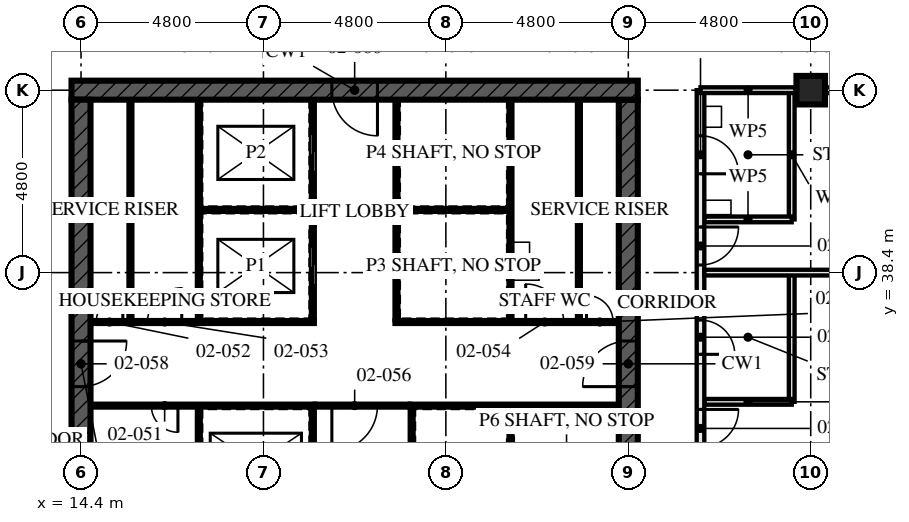
"""IFC4 building model, lengths in metres.
Left out: names, types, materials, properties, quantities, classifications, styles, units other than length and angle.
Written with IfcOpenShell. Run it as: python <this file> out.ifc"""

import sys

from ifc_helpers import new_model, si_unit, direction, frame, frame_2d, origin, origin_2d, place, context, subcontext, project, spatial, rectangle, hollow_rectangle, extrude, element, fill, save


model = new_model("IFC4")
c1 = context("Model", 3, precision=1e-05, world=origin(), true_north=direction((0.0, 1.0)))
c2 = subcontext(c1, "Body", "Model", "MODEL_VIEW")
j1 = project(units=[si_unit("LENGTHUNIT", "METRE"), si_unit("PLANEANGLEUNIT", "RADIAN")], contexts=[c1])
p1 = place(None, origin())
s1 = spatial("IfcSite", under=j1, at=p1, CompositionType="ELEMENT")
p2 = place(p1, origin())
s2 = spatial("IfcBuilding", under=s1, at=p2, CompositionType="ELEMENT")
p3 = place(p2, frame((0.0, 0.0, 9.0)))
s3 = spatial("IfcBuildingStorey", under=s2, at=p3, CompositionType="ELEMENT", Elevation=9.0)
p4 = place(p3, frame((33.6, 43.2, 0.0), z_axis=(0.0, 0.0, 1.0), x_axis=(0.0, 1.0, 0.0)))
e1 = element("IfcColumn", 1, at=p4, inside=s3, PredefinedType="COLUMN", context=c2, shape_type="SweptSolid", body=[
    extrude(hollow_rectangle(XDim=0.75, YDim=0.75, WallThickness=0.08, at=origin_2d()), origin(), (0.0, 0.0, 1.0), 4.5),
])
p5 = place(p3, frame((29.05, 43.2, -0.17), z_axis=(0.0, 0.0, 1.0), x_axis=(-1.0, 0.0, 0.0)))
e2 = element("IfcWall", 2, at=p5, inside=s3, PredefinedType="SHEAR", context=c2, shape_type="SweptSolid", body=[
    extrude(rectangle(XDim=14.9, YDim=0.5, at=frame_2d((7.45, 0.0))), origin(), (0.0, 0.0, 1.0), 4.5),
])
p6 = place(p5, frame((6.85, 0.0, 0.17)))
e3 = element("IfcOpeningElement", 3, at=p6, cuts=e2, PredefinedType="OPENING", context=c2, shape_type="SweptSolid", body=[
    extrude(rectangle(XDim=1.2, YDim=2.1, at=frame_2d((0.6, 1.05))), frame((0.0, 0.26, 0.0), z_axis=(0.0, -1.0, 0.0), x_axis=(1.0, 0.0, 0.0)), (0.0, 0.0, 1.0), 0.521),
])
p7 = place(p3, frame((14.4, 42.95, -0.17), z_axis=(0.0, 0.0, 1.0), x_axis=(0.0, -1.0, 0.0)))
e4 = element("IfcWall", 4, at=p7, inside=s3, PredefinedType="SHEAR", context=c2, shape_type="SweptSolid", body=[
    extrude(rectangle(XDim=13.9, YDim=0.5, at=frame_2d((6.95, 0.0))), origin(), (0.0, 0.0, 1.0), 4.5),
])
p8 = place(p7, frame((6.35, 0.0, 0.17)))
e5 = element("IfcOpeningElement", 5, at=p8, cuts=e4, PredefinedType="OPENING", context=c2, shape_type="SweptSolid", body=[
    extrude(rectangle(XDim=1.2, YDim=2.1, at=frame_2d((0.6, 1.05))), frame((0.0, 0.26, 0.0), z_axis=(0.0, -1.0, 0.0), x_axis=(1.0, 0.0, 0.0)), (0.0, 0.0, 1.0), 0.521),
])
p9 = place(p3, frame((28.8, 29.05, -0.17), z_axis=(0.0, 0.0, 1.0), x_axis=(0.0, 1.0, 0.0)))
e6 = element("IfcWall", 6, at=p9, inside=s3, PredefinedType="SHEAR", context=c2, shape_type="SweptSolid", body=[
    extrude(rectangle(XDim=13.9, YDim=0.5, at=frame_2d((6.95, 0.0))), origin(), (0.0, 0.0, 1.0), 4.5),
])
p10 = place(p9, frame((6.35, 0.0, 0.17)))
e7 = element("IfcOpeningElement", 7, at=p10, cuts=e6, PredefinedType="OPENING", context=c2, shape_type="SweptSolid", body=[
    extrude(rectangle(XDim=1.2, YDim=2.1, at=frame_2d((0.6, 1.05))), frame((0.0, 0.26, 0.0), z_axis=(0.0, -1.0, 0.0), x_axis=(1.0, 0.0, 0.0)), (0.0, 0.0, 1.0), 0.521),
])
p11 = place(p3, frame((33.1, 35.0, 0.0), z_axis=(0.0, 0.0, 1.0), x_axis=(-1.0, 0.0, 0.0)))
e8 = element("IfcWall", 8, at=p11, inside=s3, PredefinedType="PARTITIONING", context=c2, shape_type="SweptSolid", body=[
    extrude(rectangle(XDim=2.3, YDim=0.15, at=frame_2d((1.15, 0.0))), origin(), (0.0, 0.0, 1.0), 4.33),
])
p12 = place(p3, frame((33.1, 35.0, 0.0), z_axis=(0.0, 0.0, 1.0), x_axis=(0.0, 1.0, 0.0)))
e9 = element("IfcWall", 9, at=p12, inside=s3, PredefinedType="PARTITIONING", context=c2, shape_type="SweptSolid", body=[
    extrude(rectangle(XDim=3.4, YDim=0.15, at=frame_2d((1.7, 0.0))), origin(), (0.0, 0.0, 1.0), 4.33),
])
p13 = place(p3, frame((33.1, 39.8, 0.0), z_axis=(0.0, 0.0, 1.0), x_axis=(-1.0, 0.0, 0.0)))
e10 = element("IfcWall", 10, at=p13, inside=s3, PredefinedType="PARTITIONING", context=c2, shape_type="SweptSolid", body=[
    extrude(rectangle(XDim=2.3, YDim=0.15, at=frame_2d((1.15, 0.0))), origin(), (0.0, 0.0, 1.0), 4.33),
])
p14 = place(p3, frame((33.1, 39.8, 0.0), z_axis=(0.0, 0.0, 1.0), x_axis=(0.0, 1.0, 0.0)))
e11 = element("IfcWall", 11, at=p14, inside=s3, PredefinedType="PARTITIONING", context=c2, shape_type="SweptSolid", body=[
    extrude(rectangle(XDim=3.4, YDim=0.15, at=frame_2d((1.7, 0.0))), origin(), (0.0, 0.0, 1.0), 4.33),
])
p15 = place(p3, frame((42.805, 38.4, 0.0), z_axis=(0.0, 0.0, 1.0), x_axis=(-1.0, 0.0, 0.0)))
e12 = element("IfcWall", 12, at=p15, inside=s3, PredefinedType="PARTITIONING", context=c2, shape_type="SweptSolid", body=[
    extrude(rectangle(XDim=12.005, YDim=0.15, at=frame_2d((6.002, 0.0))), origin(), (0.0, 0.0, 1.0), 3.55),
])
p16 = place(p3, frame((30.7, 28.8, 0.0), z_axis=(0.0, 0.0, 1.0), x_axis=(0.0, 1.0, 0.0)))
e13 = element("IfcWall", 13, at=p16, inside=s3, PredefinedType="PARTITIONING", context=c2, shape_type="SweptSolid", body=[
    extrude(rectangle(XDim=14.4, YDim=0.2, at=frame_2d((7.2, 0.0))), origin(), (0.0, 0.0, 1.0), 3.55),
])
p17 = place(p16, frame((1.4, 0.0, 0.0)))
e14 = element("IfcOpeningElement", 14, at=p17, cuts=e13, PredefinedType="OPENING", context=c2, shape_type="SweptSolid", body=[
    extrude(rectangle(XDim=1.0, YDim=2.1, at=frame_2d((0.5, 1.05))), frame((0.0, 0.111, 0.0), z_axis=(0.0, -1.0, 0.0), x_axis=(1.0, 0.0, 0.0)), (0.0, 0.0, 1.0), 0.221),
])
p18 = place(p16, frame((3.6, 0.0, 0.0)))
e15 = element("IfcOpeningElement", 15, at=p18, cuts=e13, PredefinedType="OPENING", context=c2, shape_type="SweptSolid", body=[
    extrude(rectangle(XDim=1.0, YDim=2.4, at=frame_2d((0.5, 1.2))), frame((0.0, 0.111, 0.0), z_axis=(0.0, -1.0, 0.0), x_axis=(1.0, 0.0, 0.0)), (0.0, 0.0, 1.0), 0.221),
])
p19 = place(p16, frame((5.0, 0.0, 0.0)))
e16 = element("IfcOpeningElement", 16, at=p19, cuts=e13, PredefinedType="OPENING", context=c2, shape_type="SweptSolid", body=[
    extrude(rectangle(XDim=1.0, YDim=2.4, at=frame_2d((0.5, 1.2))), frame((0.0, 0.111, 0.0), z_axis=(0.0, -1.0, 0.0), x_axis=(1.0, 0.0, 0.0)), (0.0, 0.0, 1.0), 0.221),
])
p20 = place(p16, frame((9.8, 0.0, 0.0)))
e17 = element("IfcOpeningElement", 17, at=p20, cuts=e13, PredefinedType="OPENING", context=c2, shape_type="SweptSolid", body=[
    extrude(rectangle(XDim=1.0, YDim=2.4, at=frame_2d((0.5, 1.2))), frame((0.0, 0.111, 0.0), z_axis=(0.0, -1.0, 0.0), x_axis=(1.0, 0.0, 0.0)), (0.0, 0.0, 1.0), 0.221),
])
p21 = place(p16, frame((7.45, 0.0, 0.0)))
e18 = element("IfcOpeningElement", 18, at=p21, cuts=e13, PredefinedType="OPENING", context=c2, shape_type="SweptSolid", body=[
    extrude(rectangle(XDim=0.9, YDim=2.1, at=frame_2d((0.45, 1.05))), frame((0.0, 0.111, 0.0), z_axis=(0.0, -1.0, 0.0), x_axis=(1.0, 0.0, 0.0)), (0.0, 0.0, 1.0), 0.221),
])
p22 = place(p16, frame((12.2, 0.0, 0.0)))
e19 = element("IfcOpeningElement", 19, at=p22, cuts=e13, PredefinedType="OPENING", context=c2, shape_type="SweptSolid", body=[
    extrude(rectangle(XDim=1.0, YDim=2.1, at=frame_2d((0.5, 1.05))), frame((0.0, 0.111, 0.0), z_axis=(0.0, -1.0, 0.0), x_axis=(1.0, 0.0, 0.0)), (0.0, 0.0, 1.0), 0.221),
])
for number, where, z_axis, x_axis in (
    (20, (15.7, 37.15, 0.0), (0.0, 0.0, 1.0), (0.0, 1.0, 0.0)),
    (21, (27.5, 37.15, 0.0), (0.0, 0.0, 1.0), (0.0, 1.0, 0.0)),
):
    element("IfcWall", number, at=place(p3, frame(where, z_axis=z_axis, x_axis=x_axis)), inside=s3, PredefinedType="SOLIDWALL", context=c2, shape_type="SweptSolid", body=[
        extrude(rectangle(XDim=5.8, YDim=0.1, at=frame_2d((2.9, 0.0))), origin(), (0.0, 0.0, 1.0), 4.33),
    ])
p23 = place(p3, frame((20.5, 29.05, 0.0), z_axis=(0.0, 0.0, 1.0), x_axis=(0.0, 1.0, 0.0)))
e22 = element("IfcWall", 22, at=p23, inside=s3, PredefinedType="SOLIDWALL", context=c2, shape_type="SweptSolid", body=[
    extrude(rectangle(XDim=5.8, YDim=0.1, at=frame_2d((2.9, 0.0))), origin(), (0.0, 0.0, 1.0), 4.33),
])
p24 = place(p23, frame((0.8, 0.0, 0.0)))
e23 = element("IfcOpeningElement", 23, at=p24, cuts=e22, PredefinedType="OPENING", context=c2, shape_type="SweptSolid", body=[
    extrude(rectangle(XDim=1.1, YDim=2.3, at=frame_2d((0.55, 1.15))), frame((0.0, 0.061, 0.0), z_axis=(0.0, -1.0, 0.0), x_axis=(1.0, 0.0, 0.0)), (0.0, 0.0, 1.0), 0.121),
])
p25 = place(p23, frame((3.775, 0.0, 0.0)))
e24 = element("IfcOpeningElement", 24, at=p25, cuts=e22, PredefinedType="OPENING", context=c2, shape_type="SweptSolid", body=[
    extrude(rectangle(XDim=1.1, YDim=2.3, at=frame_2d((0.55, 1.15))), frame((0.0, 0.061, 0.0), z_axis=(0.0, -1.0, 0.0), x_axis=(1.0, 0.0, 0.0)), (0.0, 0.0, 1.0), 0.121),
])
p26 = place(p3, frame((20.5, 37.15, 0.0), z_axis=(0.0, 0.0, 1.0), x_axis=(0.0, 1.0, 0.0)))
e25 = element("IfcWall", 25, at=p26, inside=s3, PredefinedType="SOLIDWALL", context=c2, shape_type="SweptSolid", body=[
    extrude(rectangle(XDim=5.8, YDim=0.1, at=frame_2d((2.9, 0.0))), origin(), (0.0, 0.0, 1.0), 4.33),
])
p27 = place(p26, frame((0.925, 0.0, 0.0)))
e26 = element("IfcOpeningElement", 26, at=p27, cuts=e25, PredefinedType="OPENING", context=c2, shape_type="SweptSolid", body=[
    extrude(rectangle(XDim=1.0, YDim=2.1, at=frame_2d((0.5, 1.05))), frame((0.0, 0.061, 0.0), z_axis=(0.0, -1.0, 0.0), x_axis=(1.0, 0.0, 0.0)), (0.0, 0.0, 1.0), 0.121),
])
p28 = place(p26, frame((3.9, 0.0, 0.0)))
e27 = element("IfcOpeningElement", 27, at=p28, cuts=e25, PredefinedType="OPENING", context=c2, shape_type="SweptSolid", body=[
    extrude(rectangle(XDim=1.0, YDim=2.1, at=frame_2d((0.5, 1.05))), frame((0.0, 0.061, 0.0), z_axis=(0.0, -1.0, 0.0), x_axis=(1.0, 0.0, 0.0)), (0.0, 0.0, 1.0), 0.121),
])
p29 = place(p3, frame((22.7, 37.15, 0.0), z_axis=(0.0, 0.0, 1.0), x_axis=(0.0, 1.0, 0.0)))
e28 = element("IfcWall", 28, at=p29, inside=s3, PredefinedType="SOLIDWALL", context=c2, shape_type="SweptSolid", body=[
    extrude(rectangle(XDim=5.8, YDim=0.1, at=frame_2d((2.9, 0.0))), origin(), (0.0, 0.0, 1.0), 4.33),
])
p30 = place(p3, frame((23.1, 29.05, 0.0), z_axis=(0.0, 0.0, 1.0), x_axis=(0.0, 1.0, 0.0)))
e29 = element("IfcWall", 29, at=p30, inside=s3, PredefinedType="SOLIDWALL", context=c2, shape_type="SweptSolid", body=[
    extrude(rectangle(XDim=5.8, YDim=0.1, at=frame_2d((2.9, 0.0))), origin(), (0.0, 0.0, 1.0), 4.33),
])
p31 = place(p30, frame((1.0, 0.0, 0.0)))
e30 = element("IfcOpeningElement", 30, at=p31, cuts=e29, PredefinedType="OPENING", context=c2, shape_type="SweptSolid", body=[
    extrude(rectangle(XDim=0.7, YDim=2.1, at=frame_2d((0.35, 1.05))), frame((0.0, 0.061, 0.0), z_axis=(0.0, -1.0, 0.0), x_axis=(1.0, 0.0, 0.0)), (0.0, 0.0, 1.0), 0.121),
])
p32 = place(p3, frame((14.65, 34.9, 0.0), z_axis=(0.0, 0.0, 1.0), x_axis=(1.0, 0.0, 0.0)))
e31 = element("IfcWall", 31, at=p32, inside=s3, PredefinedType="SOLIDWALL", context=c2, shape_type="SweptSolid", body=[
    extrude(rectangle(XDim=5.9, YDim=0.1, at=frame_2d((2.95, 0.0))), origin(), (0.0, 0.0, 1.0), 4.33),
])
p33 = place(p32, frame((1.6, 0.0, 0.0)))
e32 = element("IfcOpeningElement", 32, at=p33, cuts=e31, PredefinedType="OPENING", context=c2, shape_type="SweptSolid", body=[
    extrude(rectangle(XDim=0.7, YDim=2.1, at=frame_2d((0.35, 1.05))), frame((0.0, 0.061, 0.0), z_axis=(0.0, -1.0, 0.0), x_axis=(1.0, 0.0, 0.0)), (0.0, 0.0, 1.0), 0.121),
])
p34 = place(p3, frame((23.05, 34.9, 0.0), z_axis=(0.0, 0.0, 1.0), x_axis=(1.0, 0.0, 0.0)))
e33 = element("IfcWall", 33, at=p34, inside=s3, PredefinedType="SOLIDWALL", context=c2, shape_type="SweptSolid", body=[
    extrude(rectangle(XDim=5.5, YDim=0.1, at=frame_2d((2.75, 0.0))), origin(), (0.0, 0.0, 1.0), 4.33),
])
p35 = place(p3, frame((14.65, 37.1, 0.0), z_axis=(0.0, 0.0, 1.0), x_axis=(1.0, 0.0, 0.0)))
e34 = element("IfcWall", 34, at=p35, inside=s3, PredefinedType="SOLIDWALL", context=c2, shape_type="SweptSolid", body=[
    extrude(rectangle(XDim=5.9, YDim=0.1, at=frame_2d((2.95, 0.0))), origin(), (0.0, 0.0, 1.0), 4.33),
])
p36 = place(p35, frame((0.15, 0.0, 0.0)))
e35 = element("IfcOpeningElement", 35, at=p36, cuts=e34, PredefinedType="OPENING", context=c2, shape_type="SweptSolid", body=[
    extrude(rectangle(XDim=0.7, YDim=2.1, at=frame_2d((0.35, 1.05))), frame((0.0, 0.061, 0.0), z_axis=(0.0, -1.0, 0.0), x_axis=(1.0, 0.0, 0.0)), (0.0, 0.0, 1.0), 0.121),
])
p37 = place(p35, frame((1.5, 0.0, 0.0)))
e36 = element("IfcOpeningElement", 36, at=p37, cuts=e34, PredefinedType="OPENING", context=c2, shape_type="SweptSolid", body=[
    extrude(rectangle(XDim=0.9, YDim=2.1, at=frame_2d((0.45, 1.05))), frame((0.0, 0.061, 0.0), z_axis=(0.0, -1.0, 0.0), x_axis=(1.0, 0.0, 0.0)), (0.0, 0.0, 1.0), 0.121),
])
p38 = place(p3, frame((22.65, 37.1, 0.0), z_axis=(0.0, 0.0, 1.0), x_axis=(1.0, 0.0, 0.0)))
e37 = element("IfcWall", 37, at=p38, inside=s3, PredefinedType="SOLIDWALL", context=c2, shape_type="SweptSolid", body=[
    extrude(rectangle(XDim=5.9, YDim=0.1, at=frame_2d((2.95, 0.0))), origin(), (0.0, 0.0, 1.0), 4.33),
])
p39 = place(p38, frame((3.45, 0.0, 0.0)))
e38 = element("IfcOpeningElement", 38, at=p39, cuts=e37, PredefinedType="OPENING", context=c2, shape_type="SweptSolid", body=[
    extrude(rectangle(XDim=1.0, YDim=2.1, at=frame_2d((0.5, 1.05))), frame((0.0, 0.061, 0.0), z_axis=(0.0, -1.0, 0.0), x_axis=(1.0, 0.0, 0.0)), (0.0, 0.0, 1.0), 0.121),
])
p40 = place(p38, frame((5.05, 0.0, 0.0)))
e39 = element("IfcOpeningElement", 39, at=p40, cuts=e37, PredefinedType="OPENING", context=c2, shape_type="SweptSolid", body=[
    extrude(rectangle(XDim=0.7, YDim=2.1, at=frame_2d((0.35, 1.05))), frame((0.0, 0.061, 0.0), z_axis=(0.0, -1.0, 0.0), x_axis=(1.0, 0.0, 0.0)), (0.0, 0.0, 1.0), 0.121),
])
p41 = place(p3, frame((20.55, 34.9, 0.0), z_axis=(0.0, 0.0, 1.0), x_axis=(1.0, 0.0, 0.0)))
e40 = element("IfcWall", 40, at=p41, inside=s3, PredefinedType="SOLIDWALL", context=c2, shape_type="SweptSolid", body=[
    extrude(rectangle(XDim=2.5, YDim=0.1, at=frame_2d((1.25, 0.0))), origin(), (0.0, 0.0, 1.0), 4.33),
])
p42 = place(p41, frame((0.45, 0.0, 0.0)))
e41 = element("IfcOpeningElement", 41, at=p42, cuts=e40, PredefinedType="OPENING", context=c2, shape_type="SweptSolid", body=[
    extrude(rectangle(XDim=1.2, YDim=2.1, at=frame_2d((0.6, 1.05))), frame((0.0, 0.061, 0.0), z_axis=(0.0, -1.0, 0.0), x_axis=(1.0, 0.0, 0.0)), (0.0, 0.0, 1.0), 0.121),
])
for number, where, z_axis, x_axis in (
    (42, (17.5, 29.05, 0.0), (0.0, 0.0, 1.0), (0.0, 1.0, 0.0)),
    (43, (17.5, 37.15, 0.0), (0.0, 0.0, 1.0), (0.0, 1.0, 0.0)),
):
    element("IfcWall", number, at=place(p3, frame(where, z_axis=z_axis, x_axis=x_axis)), inside=s3, PredefinedType="SOLIDWALL", context=c2, shape_type="SweptSolid", body=[
        extrude(rectangle(XDim=5.8, YDim=0.1, at=frame_2d((2.9, 0.0))), origin(), (0.0, 0.0, 1.0), 4.33),
    ])
for number, where, z_axis, x_axis in (
    (44, (17.55, 40.05, 0.0), (0.0, 0.0, 1.0), (1.0, 0.0, 0.0)),
    (45, (22.75, 40.05, 0.0), (0.0, 0.0, 1.0), (1.0, 0.0, 0.0)),
):
    element("IfcWall", number, at=place(p3, frame(where, z_axis=z_axis, x_axis=x_axis)), inside=s3, PredefinedType="SOLIDWALL", context=c2, shape_type="SweptSolid", body=[
        extrude(rectangle(XDim=2.9, YDim=0.1, at=frame_2d((1.45, 0.0))), origin(), (0.0, 0.0, 1.0), 4.33),
    ])
p43 = place(p3, frame((25.7, 37.15, 0.0), z_axis=(0.0, 0.0, 1.0), x_axis=(0.0, 1.0, 0.0)))
e46 = element("IfcWall", 46, at=p43, inside=s3, PredefinedType="SOLIDWALL", context=c2, shape_type="SweptSolid", body=[
    extrude(rectangle(XDim=5.8, YDim=0.1, at=frame_2d((2.9, 0.0))), origin(), (0.0, 0.0, 1.0), 4.33),
])
p44 = place(p3, frame((25.7, 31.95, 0.0), z_axis=(0.0, 0.0, 1.0), x_axis=(0.0, 1.0, 0.0)))
e47 = element("IfcWall", 47, at=p44, inside=s3, PredefinedType="SOLIDWALL", context=c2, shape_type="SweptSolid", body=[
    extrude(rectangle(XDim=2.9, YDim=0.1, at=frame_2d((1.45, 0.0))), origin(), (0.0, 0.0, 1.0), 4.33),
])
p45 = place(p3, frame((38.005, 43.2, 0.0), z_axis=(0.0, 0.0, 1.0), x_axis=(-1.0, 0.0, 0.0)))
e48 = element("IfcWall", 48, at=p45, inside=s3, PredefinedType="PARTITIONING", context=c2, shape_type="SweptSolid", body=[
    extrude(rectangle(XDim=4.01, YDim=0.15, at=frame_2d((2.005, 0.0))), origin(), (0.0, 0.0, 1.0), 3.32),
])
p46 = place(p3, frame((33.205, 43.2, 0.0), z_axis=(0.0, 0.0, 1.0), x_axis=(-1.0, 0.0, 0.0)))
e49 = element("IfcWall", 49, at=p46, inside=s3, PredefinedType="PARTITIONING", context=c2, shape_type="SweptSolid", body=[
    extrude(rectangle(XDim=2.505, YDim=0.15, at=frame_2d((1.252, 0.0))), origin(), (0.0, 0.0, 1.0), 3.32),
])
p47 = place(p19, frame((1.0, 0.0, 0.0), z_axis=(0.0, 0.0, 1.0), x_axis=(-1.0, 0.0, 0.0)))
e50 = element("IfcDoor", 50, at=p47, inside=s3, OperationType="SINGLE_SWING_RIGHT", PredefinedType="DOOR", context=c2, shape_type="SweptSolid", body=[
    extrude(rectangle(XDim=1.0, YDim=2.4, at=frame_2d((0.5, 1.2))), frame((0.0, 0.027, 0.0), z_axis=(0.0, -1.0, 0.0), x_axis=(1.0, 0.0, 0.0)), (0.0, 0.0, 1.0), 0.054),
])
fill(e16, e50)
p48 = place(p20, frame((1.0, 0.0, 0.0), z_axis=(0.0, 0.0, 1.0), x_axis=(-1.0, 0.0, 0.0)))
e51 = element("IfcDoor", 51, at=p48, inside=s3, OperationType="SINGLE_SWING_RIGHT", PredefinedType="DOOR", context=c2, shape_type="SweptSolid", body=[
    extrude(rectangle(XDim=1.0, YDim=2.4, at=frame_2d((0.5, 1.2))), frame((0.0, 0.027, 0.0), z_axis=(0.0, -1.0, 0.0), x_axis=(1.0, 0.0, 0.0)), (0.0, 0.0, 1.0), 0.054),
])
fill(e17, e51)
p49 = place(p21, frame((0.9, 0.0, 0.0), z_axis=(0.0, 0.0, 1.0), x_axis=(-1.0, 0.0, 0.0)))
e52 = element("IfcDoor", 52, at=p49, inside=s3, OperationType="SINGLE_SWING_LEFT", PredefinedType="DOOR", context=c2, shape_type="SweptSolid", body=[
    extrude(rectangle(XDim=0.9, YDim=2.1, at=frame_2d((0.45, 1.05))), frame((0.0, 0.027, 0.0), z_axis=(0.0, -1.0, 0.0), x_axis=(1.0, 0.0, 0.0)), (0.0, 0.0, 1.0), 0.054),
])
fill(e18, e52)
p50 = place(p22, frame((1.0, 0.0, 0.0), z_axis=(0.0, 0.0, 1.0), x_axis=(-1.0, 0.0, 0.0)))
e53 = element("IfcDoor", 53, at=p50, inside=s3, OperationType="SINGLE_SWING_LEFT", PredefinedType="DOOR", context=c2, shape_type="SweptSolid", body=[
    extrude(rectangle(XDim=1.0, YDim=2.1, at=frame_2d((0.5, 1.05))), frame((0.0, 0.027, 0.0), z_axis=(0.0, -1.0, 0.0), x_axis=(1.0, 0.0, 0.0)), (0.0, 0.0, 1.0), 0.054),
])
fill(e19, e53)
p51 = place(p27, origin())
e54 = element("IfcDoor", 54, at=p51, inside=s3, OperationType="SLIDING_TO_LEFT", PredefinedType="DOOR", context=c2, shape_type="SweptSolid", body=[
    extrude(rectangle(XDim=1.0, YDim=2.1, at=frame_2d((0.5, 1.05))), frame((0.0, 0.05, 0.0), z_axis=(0.0, -1.0, 0.0), x_axis=(1.0, 0.0, 0.0)), (0.0, 0.0, 1.0), 0.1),
])
fill(e26, e54)
p52 = place(p28, origin())
e55 = element("IfcDoor", 55, at=p52, inside=s3, OperationType="SLIDING_TO_LEFT", PredefinedType="DOOR", context=c2, shape_type="SweptSolid", body=[
    extrude(rectangle(XDim=1.0, YDim=2.1, at=frame_2d((0.5, 1.05))), frame((0.0, 0.05, 0.0), z_axis=(0.0, -1.0, 0.0), x_axis=(1.0, 0.0, 0.0)), (0.0, 0.0, 1.0), 0.1),
])
fill(e27, e55)
p53 = place(p33, frame((0.7, 0.0, 0.0), z_axis=(0.0, 0.0, 1.0), x_axis=(-1.0, 0.0, 0.0)))
e56 = element("IfcDoor", 56, at=p53, inside=s3, OperationType="SINGLE_SWING_RIGHT", PredefinedType="DOOR", context=c2, shape_type="SweptSolid", body=[
    extrude(rectangle(XDim=0.7, YDim=2.1, at=frame_2d((0.35, 1.05))), frame((0.0, 0.027, 0.0), z_axis=(0.0, -1.0, 0.0), x_axis=(1.0, 0.0, 0.0)), (0.0, 0.0, 1.0), 0.054),
])
fill(e32, e56)
p54 = place(p36, origin())
e57 = element("IfcDoor", 57, at=p54, inside=s3, OperationType="SINGLE_SWING_LEFT", PredefinedType="DOOR", context=c2, shape_type="SweptSolid", body=[
    extrude(rectangle(XDim=0.7, YDim=2.1, at=frame_2d((0.35, 1.05))), frame((0.0, 0.027, 0.0), z_axis=(0.0, -1.0, 0.0), x_axis=(1.0, 0.0, 0.0)), (0.0, 0.0, 1.0), 0.054),
])
fill(e35, e57)
p55 = place(p37, origin())
e58 = element("IfcDoor", 58, at=p55, inside=s3, OperationType="SINGLE_SWING_LEFT", PredefinedType="DOOR", context=c2, shape_type="SweptSolid", body=[
    extrude(rectangle(XDim=0.9, YDim=2.1, at=frame_2d((0.45, 1.05))), frame((0.0, 0.027, 0.0), z_axis=(0.0, -1.0, 0.0), x_axis=(1.0, 0.0, 0.0)), (0.0, 0.0, 1.0), 0.054),
])
fill(e36, e58)
p56 = place(p39, origin())
e59 = element("IfcDoor", 59, at=p56, inside=s3, OperationType="SINGLE_SWING_RIGHT", PredefinedType="DOOR", context=c2, shape_type="SweptSolid", body=[
    extrude(rectangle(XDim=1.0, YDim=2.1, at=frame_2d((0.5, 1.05))), frame((0.0, 0.027, 0.0), z_axis=(0.0, -1.0, 0.0), x_axis=(1.0, 0.0, 0.0)), (0.0, 0.0, 1.0), 0.054),
])
fill(e38, e59)
p57 = place(p40, origin())
e60 = element("IfcDoor", 60, at=p57, inside=s3, OperationType="SINGLE_SWING_RIGHT", PredefinedType="DOOR", context=c2, shape_type="SweptSolid", body=[
    extrude(rectangle(XDim=0.7, YDim=2.1, at=frame_2d((0.35, 1.05))), frame((0.0, 0.027, 0.0), z_axis=(0.0, -1.0, 0.0), x_axis=(1.0, 0.0, 0.0)), (0.0, 0.0, 1.0), 0.054),
])
fill(e39, e60)
p58 = place(p42, frame((1.2, 0.0, 0.0), z_axis=(0.0, 0.0, 1.0), x_axis=(-1.0, 0.0, 0.0)))
e61 = element("IfcDoor", 61, at=p58, inside=s3, OperationType="SINGLE_SWING_LEFT", PredefinedType="DOOR", context=c2, shape_type="SweptSolid", body=[
    extrude(rectangle(XDim=1.2, YDim=2.1, at=frame_2d((0.6, 1.05))), frame((0.0, 0.027, 0.0), z_axis=(0.0, -1.0, 0.0), x_axis=(1.0, 0.0, 0.0)), (0.0, 0.0, 1.0), 0.054),
])
fill(e41, e61)
p59 = place(p8, origin())
e62 = element("IfcDoor", 62, at=p59, inside=s3, OperationType="SINGLE_SWING_LEFT", PredefinedType="DOOR", context=c2, shape_type="SweptSolid", body=[
    extrude(rectangle(XDim=1.2, YDim=2.1, at=frame_2d((0.6, 1.05))), frame((0.0, 0.027, 0.0), z_axis=(0.0, -1.0, 0.0), x_axis=(1.0, 0.0, 0.0)), (0.0, 0.0, 1.0), 0.054),
])
fill(e5, e62)
p60 = place(p10, origin())
e63 = element("IfcDoor", 63, at=p60, inside=s3, OperationType="SINGLE_SWING_LEFT", PredefinedType="DOOR", context=c2, shape_type="SweptSolid", body=[
    extrude(rectangle(XDim=1.2, YDim=2.1, at=frame_2d((0.6, 1.05))), frame((0.0, 0.027, 0.0), z_axis=(0.0, -1.0, 0.0), x_axis=(1.0, 0.0, 0.0)), (0.0, 0.0, 1.0), 0.054),
])
fill(e7, e63)
p61 = place(p6, origin())
e64 = element("IfcDoor", 64, at=p61, inside=s3, OperationType="SINGLE_SWING_LEFT", PredefinedType="DOOR", context=c2, shape_type="SweptSolid", body=[
    extrude(rectangle(XDim=1.2, YDim=2.1, at=frame_2d((0.6, 1.05))), frame((0.0, 0.027, 0.0), z_axis=(0.0, -1.0, 0.0), x_axis=(1.0, 0.0, 0.0)), (0.0, 0.0, 1.0), 0.054),
])
fill(e3, e64)
save(model, sys.argv[1])
